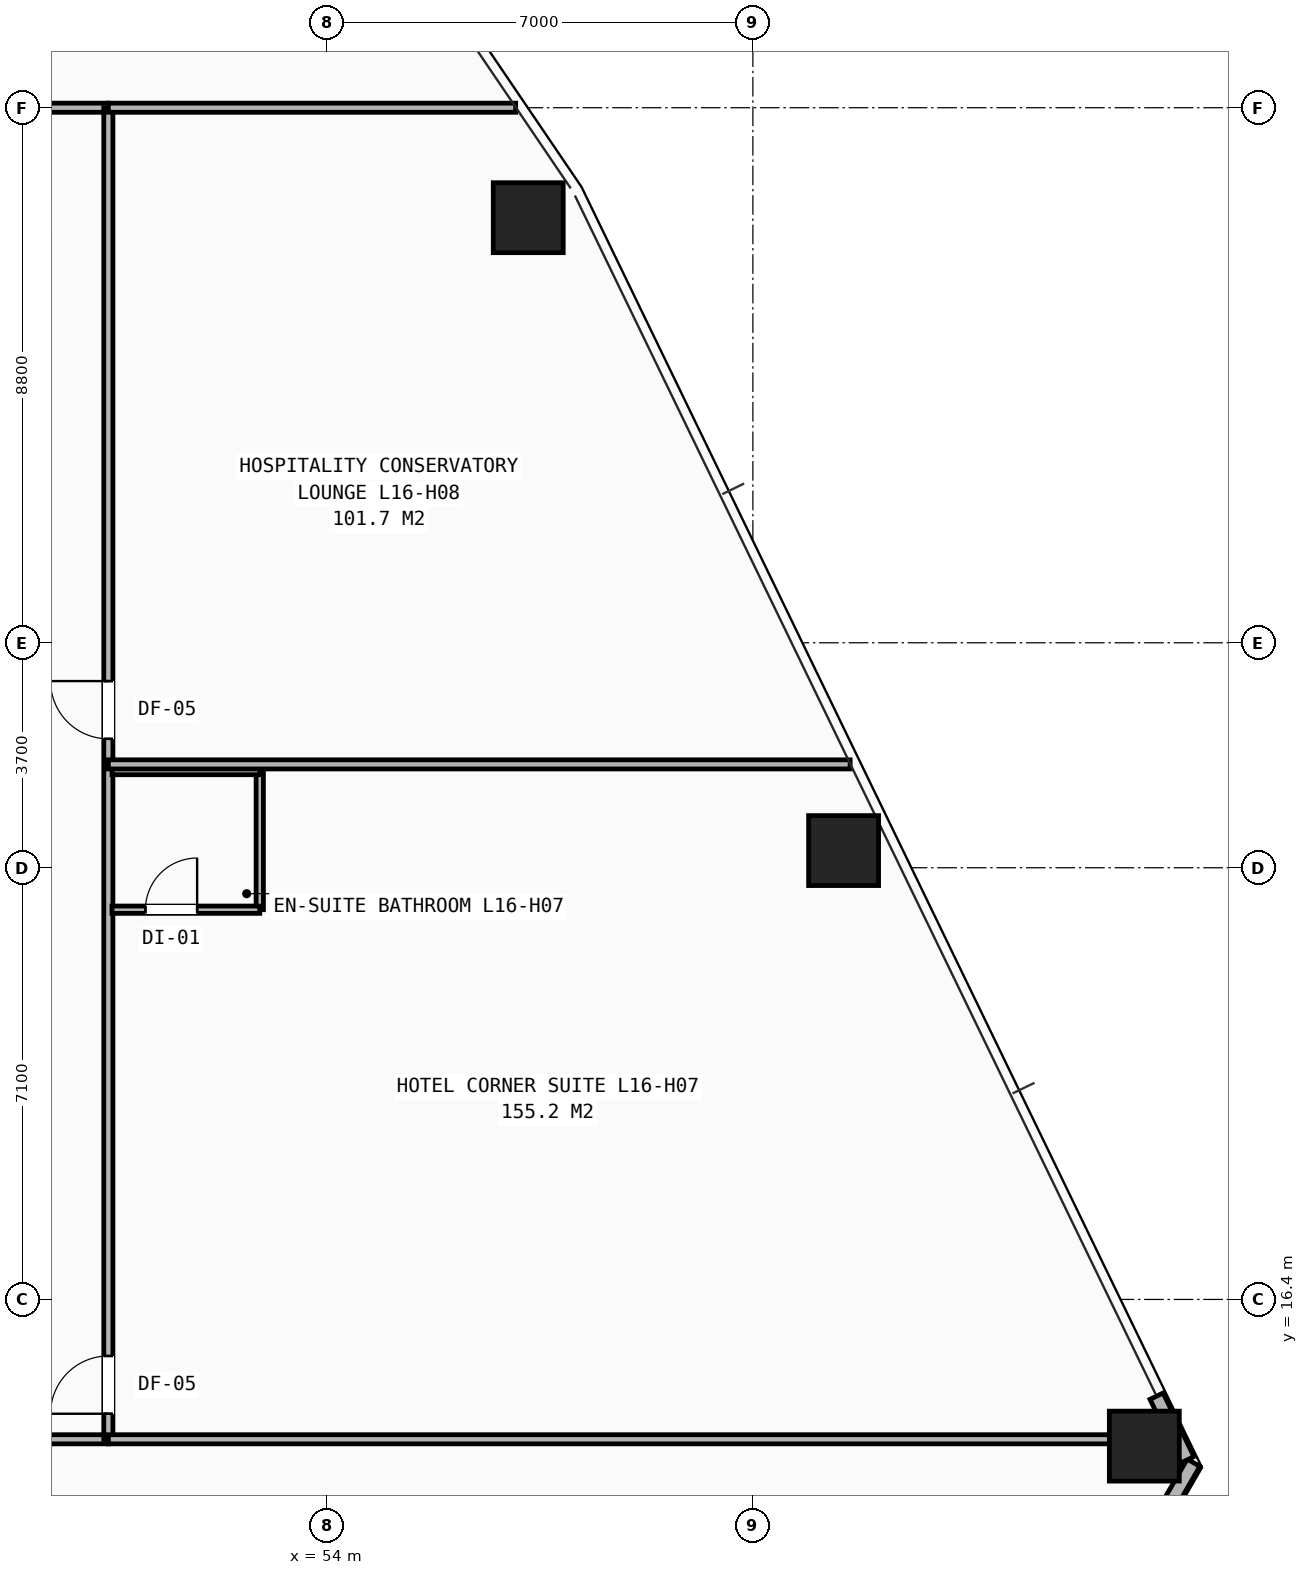
"""IFC4 building model, lengths in metres.
Left out: names, types, materials, properties, quantities, classifications, styles, units other than length and angle.
Written with IfcOpenShell. Run it as: python <this file> out.ifc"""

import sys

from ifc_helpers import new_model, si_unit, direction, frame, frame_2d, origin, origin_2d, place, context, subcontext, project, spatial, rectangle, hollow_rectangle, extrude, element, fill, save


model = new_model("IFC4")
c1 = context("Model", 3, precision=1e-05, world=origin(), true_north=direction((0.0, 1.0)))
c2 = subcontext(c1, "Body", "Model", "MODEL_VIEW")
j1 = project(units=[si_unit("LENGTHUNIT", "METRE"), si_unit("PLANEANGLEUNIT", "RADIAN")], contexts=[c1])
p1 = place(None, origin())
s1 = spatial("IfcSite", under=j1, at=p1, CompositionType="ELEMENT")
p2 = place(p1, origin())
s2 = spatial("IfcBuilding", under=s1, at=p2, CompositionType="ELEMENT")
p3 = place(p2, frame((0.0, 0.0, 59.2)))
s3 = spatial("IfcBuildingStorey", under=s2, at=p3, CompositionType="ELEMENT", Elevation=59.2)
for number, where, z_axis, x_axis in (
    (1, (67.437, 13.988, 0.0), (0.0, 0.0, 1.0), (1.0, 0.0, 0.0)),
    (2, (62.492, 23.782, 0.0), (0.0, 0.0, 1.0), (1.0, 0.0, 0.0)),
    (3, (57.305, 34.191, 0.0), (0.0, 0.0, 1.0), (1.0, 0.0, 0.0)),
):
    element("IfcColumn", number, at=place(p3, frame(where, z_axis=z_axis, x_axis=x_axis)), inside=s3, PredefinedType="COLUMN", context=c2, shape_type="SweptSolid", body=[
        extrude(hollow_rectangle(XDim=1.15, YDim=1.15, WallThickness=0.075, at=origin_2d()), origin(), (0.0, 0.0, 1.0), 3.2),
    ])
p4 = place(p3, frame((68.247, 13.715, 0.0), z_axis=(0.0, 0.0, 1.0), x_axis=(-0.499984376209, -0.866034423996, 0.0)))
e4 = element("IfcWall", 4, at=p4, inside=s3, PredefinedType="SHEAR", context=c2, shape_type="SweptSolid", body=[
    extrude(rectangle(XDim=10.086, YDim=0.24, at=frame_2d((5.043, 0.0))), origin(), (0.0, 0.0, 1.0), 2.263),
])
p5 = place(p3, frame((68.146, 13.763, 0.0), z_axis=(0.0, 0.0, 1.0), x_axis=(-0.436005533542, 0.899943984213, 0.0)))
e5 = element("IfcWall", 5, at=p5, inside=s3, PredefinedType="SHEAR", context=c2, shape_type="SweptSolid", body=[
    extrude(rectangle(XDim=1.162, YDim=0.24, at=frame_2d((0.581, 0.0))), origin(), (0.0, 0.0, 1.0), 2.263),
])
p6 = place(p3, frame((29.6, 14.1, 0.0), z_axis=(0.0, 0.0, 1.0), x_axis=(1.0, 0.0, 0.0)))
e6 = element("IfcWall", 6, at=p6, inside=s3, PredefinedType="PARTITIONING", context=c2, shape_type="SweptSolid", body=[
    extrude(rectangle(XDim=20.8, YDim=0.15, at=frame_2d((10.4, 0.0))), origin(), (0.0, 0.0, 1.0), 2.191),
])
p7 = place(p6, frame((0.57, 0.0, 0.0)))
e7 = element("IfcOpeningElement", 7, at=p7, cuts=e6, PredefinedType="OPENING", context=c2, shape_type="SweptSolid", body=[
    extrude(rectangle(XDim=0.95, YDim=2.1, at=frame_2d((0.475, 1.05))), frame((0.0, 0.085, 0.0), z_axis=(0.0, -1.0, 0.0), x_axis=(1.0, 0.0, 0.0)), (0.0, 0.0, 1.0), 0.17),
])
p8 = place(p6, frame((4.82, 0.0, 0.0)))
e8 = element("IfcOpeningElement", 8, at=p8, cuts=e6, PredefinedType="OPENING", context=c2, shape_type="SweptSolid", body=[
    extrude(rectangle(XDim=0.95, YDim=2.1, at=frame_2d((0.475, 1.05))), frame((0.0, 0.085, 0.0), z_axis=(0.0, -1.0, 0.0), x_axis=(1.0, 0.0, 0.0)), (0.0, 0.0, 1.0), 0.17),
])
p9 = place(p6, frame((10.82, 0.0, 0.0)))
e9 = element("IfcOpeningElement", 9, at=p9, cuts=e6, PredefinedType="OPENING", context=c2, shape_type="SweptSolid", body=[
    extrude(rectangle(XDim=0.95, YDim=2.1, at=frame_2d((0.475, 1.05))), frame((0.0, 0.085, 0.0), z_axis=(0.0, -1.0, 0.0), x_axis=(1.0, 0.0, 0.0)), (0.0, 0.0, 1.0), 0.17),
])
p10 = place(p6, frame((16.82, 0.0, 0.0)))
e10 = element("IfcOpeningElement", 10, at=p10, cuts=e6, PredefinedType="OPENING", context=c2, shape_type="SweptSolid", body=[
    extrude(rectangle(XDim=0.95, YDim=2.1, at=frame_2d((0.475, 1.05))), frame((0.0, 0.085, 0.0), z_axis=(0.0, -1.0, 0.0), x_axis=(1.0, 0.0, 0.0)), (0.0, 0.0, 1.0), 0.17),
])
p11 = place(p3, frame((40.75, 36.0, 0.0), z_axis=(0.0, 0.0, 1.0), x_axis=(1.0, 0.0, 0.0)))
e11 = element("IfcWall", 11, at=p11, inside=s3, PredefinedType="PARTITIONING", context=c2, shape_type="SweptSolid", body=[
    extrude(rectangle(XDim=9.65, YDim=0.15, at=frame_2d((4.825, 0.0))), origin(), (0.0, 0.0, 1.0), 2.513),
])
p12 = place(p3, frame((50.4, 14.1, 0.0), z_axis=(0.0, 0.0, 1.0), x_axis=(0.0, 1.0, 0.0)))
e12 = element("IfcWall", 12, at=p12, inside=s3, PredefinedType="PARTITIONING", context=c2, shape_type="SweptSolid", body=[
    extrude(rectangle(XDim=21.9, YDim=0.15, at=frame_2d((10.95, 0.0))), origin(), (0.0, 0.0, 1.0), 2.191),
])
p13 = place(p12, frame((0.42, 0.0, 0.0)))
e13 = element("IfcOpeningElement", 13, at=p13, cuts=e12, PredefinedType="OPENING", context=c2, shape_type="SweptSolid", body=[
    extrude(rectangle(XDim=0.95, YDim=2.1, at=frame_2d((0.475, 1.05))), frame((0.0, 0.085, 0.0), z_axis=(0.0, -1.0, 0.0), x_axis=(1.0, 0.0, 0.0)), (0.0, 0.0, 1.0), 0.17),
])
p14 = place(p12, frame((11.52, 0.0, 0.0)))
e14 = element("IfcOpeningElement", 14, at=p14, cuts=e12, PredefinedType="OPENING", context=c2, shape_type="SweptSolid", body=[
    extrude(rectangle(XDim=0.95, YDim=2.1, at=frame_2d((0.475, 1.05))), frame((0.0, 0.085, 0.0), z_axis=(0.0, -1.0, 0.0), x_axis=(1.0, 0.0, 0.0)), (0.0, 0.0, 1.0), 0.17),
])
p15 = place(p3, frame((50.4, 14.1, 0.0), z_axis=(0.0, 0.0, 1.0), x_axis=(1.0, 0.0, 0.0)))
e15 = element("IfcWall", 15, at=p15, inside=s3, PredefinedType="PARTITIONING", context=c2, shape_type="SweptSolid", body=[
    extrude(rectangle(XDim=17.577, YDim=0.15, at=frame_2d((8.789, 0.0))), origin(), (0.0, 0.0, 1.0), 2.191),
])
p16 = place(p3, frame((50.4, 36.0, 0.0), z_axis=(0.0, 0.0, 1.0), x_axis=(1.0, 0.0, 0.0)))
e16 = element("IfcWall", 16, at=p16, inside=s3, PredefinedType="PARTITIONING", context=c2, shape_type="SweptSolid", body=[
    extrude(rectangle(XDim=6.699, YDim=0.15, at=frame_2d((3.349, 0.0))), origin(), (0.0, 0.0, 1.0), 2.268),
])
p17 = place(p3, frame((52.89, 22.81, 0.0), z_axis=(0.0, 0.0, 1.0), x_axis=(0.0, 1.0, 0.0)))
e17 = element("IfcWall", 17, at=p17, inside=s3, PredefinedType="PARTITIONING", context=c2, shape_type="SweptSolid", body=[
    extrude(rectangle(XDim=2.28, YDim=0.12, at=frame_2d((1.14, 0.0))), origin(), (0.0, 0.0, 1.0), 2.98),
])
p18 = place(p3, frame((50.46, 22.81, 0.0), z_axis=(0.0, 0.0, 1.0), x_axis=(1.0, 0.0, 0.0)))
e18 = element("IfcWall", 18, at=p18, inside=s3, PredefinedType="PARTITIONING", context=c2, shape_type="SweptSolid", body=[
    extrude(rectangle(XDim=2.43, YDim=0.12, at=frame_2d((1.215, 0.0))), origin(), (0.0, 0.0, 1.0), 2.98),
])
p19 = place(p18, frame((0.55, 0.0, 0.0)))
e19 = element("IfcOpeningElement", 19, at=p19, cuts=e18, PredefinedType="OPENING", context=c2, shape_type="SweptSolid", body=[
    extrude(rectangle(XDim=0.85, YDim=2.05, at=frame_2d((0.425, 1.025))), frame((0.0, 0.07, 0.0), z_axis=(0.0, -1.0, 0.0), x_axis=(1.0, 0.0, 0.0)), (0.0, 0.0, 1.0), 0.14),
])
p20 = place(p3, frame((50.46, 25.09, 0.0), z_axis=(0.0, 0.0, 1.0), x_axis=(1.0, 0.0, 0.0)))
e20 = element("IfcWall", 20, at=p20, inside=s3, PredefinedType="PARTITIONING", context=c2, shape_type="SweptSolid", body=[
    extrude(rectangle(XDim=2.43, YDim=0.12, at=frame_2d((1.215, 0.0))), origin(), (0.0, 0.0, 1.0), 2.98),
])
p21 = place(p3, frame((50.4, 25.2, 0.0), z_axis=(0.0, 0.0, 1.0), x_axis=(1.0, 0.0, 0.0)))
e21 = element("IfcWall", 21, at=p21, inside=s3, PredefinedType="PARTITIONING", context=c2, shape_type="SweptSolid", body=[
    extrude(rectangle(XDim=12.199, YDim=0.15, at=frame_2d((6.1, 0.0))), origin(), (0.0, 0.0, 1.0), 2.268),
])
p22 = place(p13, origin())
e22 = element("IfcDoor", 22, at=p22, inside=s3, OperationType="SINGLE_SWING_LEFT", PredefinedType="DOOR", context=c2, shape_type="SweptSolid", body=[
    extrude(rectangle(XDim=0.95, YDim=2.1, at=frame_2d((0.475, 1.05))), frame((0.0, 0.025, 0.0), z_axis=(0.0, -1.0, 0.0), x_axis=(1.0, 0.0, 0.0)), (0.0, 0.0, 1.0), 0.05),
])
fill(e13, e22)
p23 = place(p19, origin())
e23 = element("IfcDoor", 23, at=p23, inside=s3, OperationType="SINGLE_SWING_RIGHT", PredefinedType="DOOR", context=c2, shape_type="SweptSolid", body=[
    extrude(rectangle(XDim=0.85, YDim=2.05, at=frame_2d((0.425, 1.025))), frame((0.0, 0.025, 0.0), z_axis=(0.0, -1.0, 0.0), x_axis=(1.0, 0.0, 0.0)), (0.0, 0.0, 1.0), 0.05),
])
fill(e19, e23)
p24 = place(p14, origin())
e24 = element("IfcDoor", 24, at=p24, inside=s3, OperationType="SINGLE_SWING_RIGHT", PredefinedType="DOOR", context=c2, shape_type="SweptSolid", body=[
    extrude(rectangle(XDim=0.95, YDim=2.1, at=frame_2d((0.475, 1.05))), frame((0.0, 0.025, 0.0), z_axis=(0.0, -1.0, 0.0), x_axis=(1.0, 0.0, 0.0)), (0.0, 0.0, 1.0), 0.05),
])
fill(e14, e24)
save(model, sys.argv[1])
